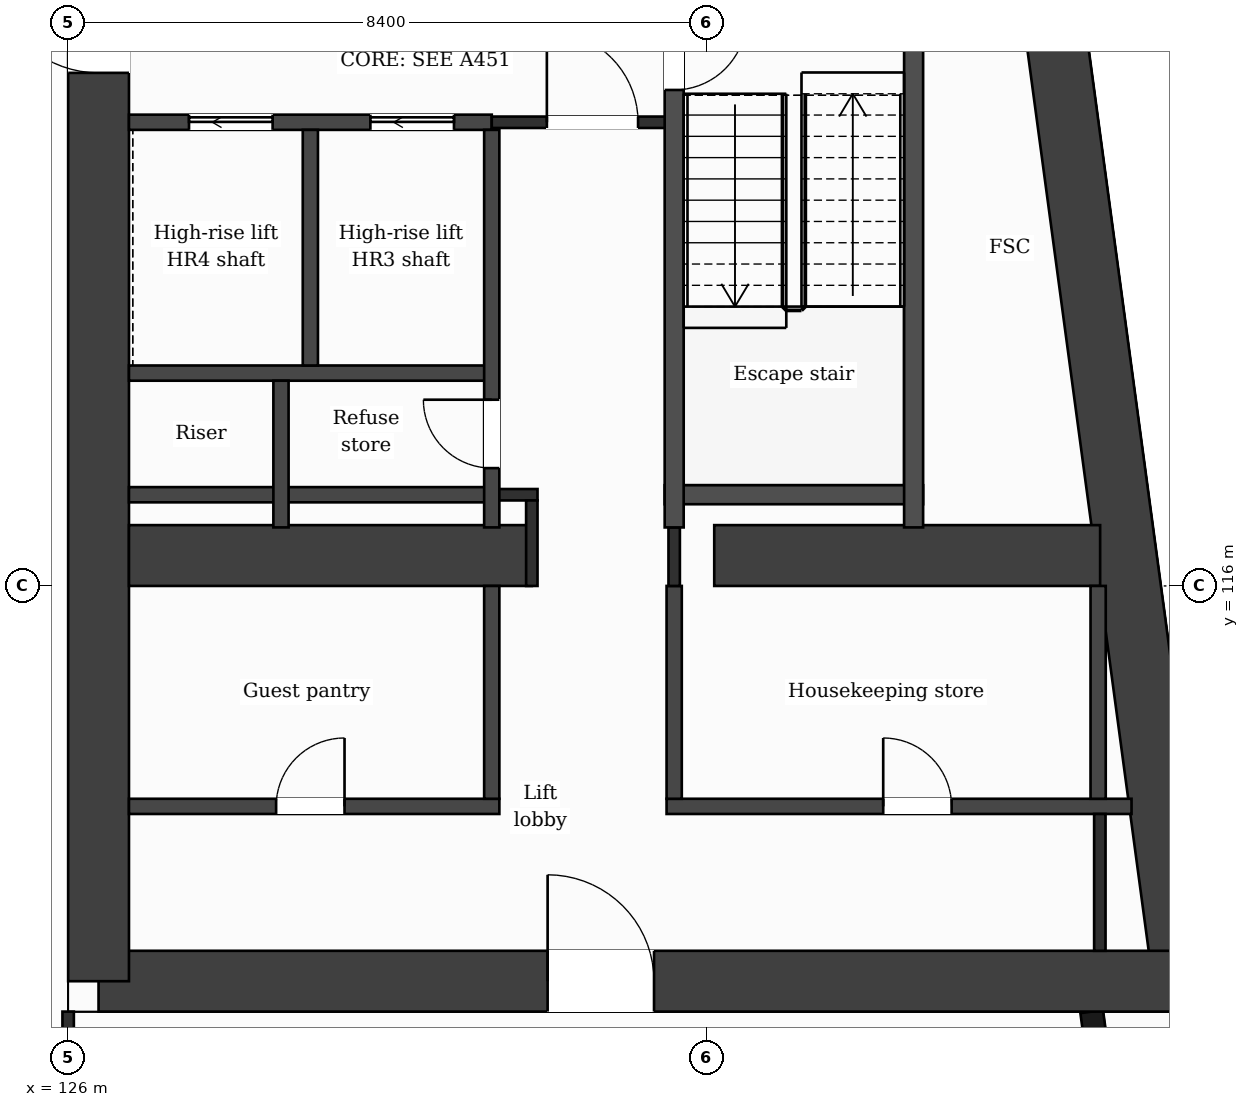
"""IFC4 building model, lengths in metres.
Left out: names, types, materials, properties, quantities, classifications, styles, units other than length and angle.
Written with IfcOpenShell. Run it as: python <this file> out.ifc"""

import sys

from ifc_helpers import new_model, si_unit, direction, frame, frame_2d, origin, place, context, subcontext, project, spatial, rectangle, extrude, element, fill, save


model = new_model("IFC4")
c1 = context("Model", 3, precision=1e-05, world=origin(), true_north=direction((0.0, 1.0)))
c2 = subcontext(c1, "Body", "Model", "MODEL_VIEW")
j1 = project(units=[si_unit("LENGTHUNIT", "METRE"), si_unit("PLANEANGLEUNIT", "RADIAN")], contexts=[c1])
p1 = place(None, origin())
s1 = spatial("IfcSite", under=j1, at=p1, CompositionType="ELEMENT")
p2 = place(p1, origin())
s2 = spatial("IfcBuilding", under=s1, at=p2, CompositionType="ELEMENT")
p3 = place(p2, frame((0.0, 0.0, 209.6)))
s3 = spatial("IfcBuildingStorey", under=s2, at=p3, CompositionType="ELEMENT", Elevation=209.6)
p4 = place(p3, frame((137.82, 132.0, 0.0), z_axis=(0.0, 0.0, 1.0), x_axis=(0.133408347329, -0.991061154956, 0.0)))
e1 = element("IfcWall", 1, at=p4, inside=s3, PredefinedType="SHEAR", context=c2, shape_type="SweptSolid", body=[
    extrude(rectangle(XDim=21.391, YDim=0.8, at=frame_2d((10.696, 0.0))), origin(), (0.0, 0.0, 1.0), 3.7),
])
p5 = place(p3, frame((140.673, 110.8, 0.0), z_axis=(0.0, 0.0, 1.0), x_axis=(-1.0, 0.0, 0.0)))
e2 = element("IfcWall", 2, at=p5, inside=s3, PredefinedType="SHEAR", context=c2, shape_type="SweptSolid", body=[
    extrude(rectangle(XDim=14.273, YDim=0.8, at=frame_2d((7.137, 0.0))), origin(), (0.0, 0.0, 1.0), 3.7),
])
p6 = place(p5, frame((6.965, 0.0, 0.0)))
e3 = element("IfcOpeningElement", 3, at=p6, cuts=e2, PredefinedType="OPENING", context=c2, shape_type="SweptSolid", body=[
    extrude(rectangle(XDim=1.4, YDim=2.1, at=frame_2d((0.7, 1.05))), frame((0.0, 0.41, 0.0), z_axis=(0.0, -1.0, 0.0), x_axis=(1.0, 0.0, 0.0)), (0.0, 0.0, 1.0), 0.82),
])
p7 = place(p3, frame((126.4, 110.8, 0.0), z_axis=(0.0, 0.0, 1.0), x_axis=(0.0, 1.0, 0.0)))
e4 = element("IfcWall", 4, at=p7, inside=s3, PredefinedType="SHEAR", context=c2, shape_type="SweptSolid", body=[
    extrude(rectangle(XDim=21.2, YDim=0.8, at=frame_2d((10.6, 0.0))), origin(), (0.0, 0.0, 1.0), 3.7),
])
p8 = place(p7, frame((11.95, 0.0, 0.0)))
e5 = element("IfcOpeningElement", 5, at=p8, cuts=e4, PredefinedType="OPENING", context=c2, shape_type="SweptSolid", body=[
    extrude(rectangle(XDim=1.4, YDim=2.1, at=frame_2d((0.7, 1.05))), frame((0.0, 0.41, 0.0), z_axis=(0.0, -1.0, 0.0), x_axis=(1.0, 0.0, 0.0)), (0.0, 0.0, 1.0), 0.82),
])
p9 = place(p3, frame((126.8, 116.4, 0.0), z_axis=(0.0, 0.0, 1.0), x_axis=(1.0, 0.0, 0.0)))
e6 = element("IfcWall", 6, at=p9, inside=s3, PredefinedType="SHEAR", context=c2, shape_type="SweptSolid", body=[
    extrude(rectangle(XDim=5.3, YDim=0.8, at=frame_2d((2.65, 0.0))), origin(), (0.0, 0.0, 1.0), 3.7),
])
p10 = place(p3, frame((134.5, 116.4, 0.0), z_axis=(0.0, 0.0, 1.0), x_axis=(1.0, 0.0, 0.0)))
e7 = element("IfcWall", 7, at=p10, inside=s3, PredefinedType="SHEAR", context=c2, shape_type="SweptSolid", body=[
    extrude(rectangle(XDim=5.077, YDim=0.8, at=frame_2d((2.539, 0.0))), origin(), (0.0, 0.0, 1.0), 3.7),
])
p11 = place(p3, frame((140.348, 103.85, 0.0), z_axis=(0.0, 0.0, 1.0), x_axis=(-0.133431549479, 0.991058031401, 0.0)))
e8 = element("IfcWall", 8, at=p11, inside=s3, PredefinedType="SOLIDWALL", context=c2, shape_type="SweptSolid", body=[
    extrude(rectangle(XDim=6.609, YDim=0.3, at=frame_2d((3.304, 0.0))), origin(), (0.0, 0.0, 1.0), 3.38),
])
p12 = place(p11, frame((0.737, 0.0, 0.9)))
e9 = element("IfcOpeningElement", 9, at=p12, cuts=e8, PredefinedType="OPENING", context=c2, shape_type="SweptSolid", body=[
    extrude(rectangle(XDim=1.2, YDim=2.1, at=frame_2d((0.6, 1.05))), frame((0.0, 0.16, 0.0), z_axis=(0.0, -1.0, 0.0), x_axis=(1.0, 0.0, 0.0)), (0.0, 0.0, 1.0), 0.32),
])
p13 = place(p11, frame((3.991, 0.0, 0.0)))
e10 = element("IfcOpeningElement", 10, at=p13, cuts=e8, PredefinedType="OPENING", context=c2, shape_type="SweptSolid", body=[
    extrude(rectangle(XDim=1.2, YDim=2.4, at=frame_2d((0.6, 1.2))), frame((0.0, 0.16, 0.0), z_axis=(0.0, -1.0, 0.0), x_axis=(1.0, 0.0, 0.0)), (0.0, 0.0, 1.0), 0.32),
])
p14 = place(p3, frame((126.8, 113.1, 0.0), z_axis=(0.0, 0.0, 1.0), x_axis=(1.0, 0.0, 0.0)))
e11 = element("IfcWall", 11, at=p14, inside=s3, PredefinedType="PARTITIONING", context=c2, shape_type="SweptSolid", body=[
    extrude(rectangle(XDim=4.873, YDim=0.2, at=frame_2d((2.437, 0.0))), origin(), (0.0, 0.0, 1.0), 3.38),
])
p15 = place(p14, frame((1.936, 0.0, 0.0)))
e12 = element("IfcOpeningElement", 12, at=p15, cuts=e11, PredefinedType="OPENING", context=c2, shape_type="SweptSolid", body=[
    extrude(rectangle(XDim=0.9, YDim=2.1, at=frame_2d((0.45, 1.05))), frame((0.0, 0.11, 0.0), z_axis=(0.0, -1.0, 0.0), x_axis=(1.0, 0.0, 0.0)), (0.0, 0.0, 1.0), 0.22),
])
p16 = place(p3, frame((133.873, 113.1, 0.0), z_axis=(0.0, 0.0, 1.0), x_axis=(1.0, 0.0, 0.0)))
e13 = element("IfcWall", 13, at=p16, inside=s3, PredefinedType="PARTITIONING", context=c2, shape_type="SweptSolid", body=[
    extrude(rectangle(XDim=6.117, YDim=0.2, at=frame_2d((3.059, 0.0))), origin(), (0.0, 0.0, 1.0), 3.38),
])
p17 = place(p16, frame((2.85, 0.0, 0.0)))
e14 = element("IfcOpeningElement", 14, at=p17, cuts=e13, PredefinedType="OPENING", context=c2, shape_type="SweptSolid", body=[
    extrude(rectangle(XDim=0.9, YDim=2.1, at=frame_2d((0.45, 1.05))), frame((0.0, 0.11, 0.0), z_axis=(0.0, -1.0, 0.0), x_axis=(1.0, 0.0, 0.0)), (0.0, 0.0, 1.0), 0.22),
])
p18 = place(p3, frame((126.8, 117.2, 0.0), z_axis=(0.0, 0.0, 1.0), x_axis=(1.0, 0.0, 0.0)))
e15 = element("IfcWall", 15, at=p18, inside=s3, PredefinedType="PARTITIONING", context=c2, shape_type="SweptSolid", body=[
    extrude(rectangle(XDim=4.773, YDim=0.2, at=frame_2d((2.386, 0.0))), origin(), (0.0, 0.0, 1.0), 3.38),
])
p19 = place(p3, frame((131.573, 117.2, 0.0), z_axis=(0.0, 0.0, 1.0), x_axis=(1.0, 0.0, 0.0)))
e16 = element("IfcWall", 16, at=p19, inside=s3, PredefinedType="PARTITIONING", context=c2, shape_type="SweptSolid", body=[
    extrude(rectangle(XDim=0.602, YDim=0.15, at=frame_2d((0.301, 0.0))), origin(), (0.0, 0.0, 1.0), 3.38),
])
p20 = place(p3, frame((133.848, 117.2, 0.0), z_axis=(0.0, 0.0, 1.0), x_axis=(1.0, 0.0, 0.0)))
e17 = element("IfcWall", 17, at=p20, inside=s3, PredefinedType="PARTITIONING", context=c2, shape_type="SweptSolid", body=[
    extrude(rectangle(XDim=3.4, YDim=0.25, at=frame_2d((1.7, 0.0))), origin(), (0.0, 0.0, 1.0), 3.38),
])
p21 = place(p3, frame((126.8, 118.8, 0.0), z_axis=(0.0, 0.0, 1.0), x_axis=(1.0, 0.0, 0.0)))
e18 = element("IfcWall", 18, at=p21, inside=s3, PredefinedType="PARTITIONING", context=c2, shape_type="SweptSolid", body=[
    extrude(rectangle(XDim=4.773, YDim=0.2, at=frame_2d((2.386, 0.0))), origin(), (0.0, 0.0, 1.0), 3.38),
])
p22 = place(p3, frame((126.8, 122.1, 0.0), z_axis=(0.0, 0.0, 1.0), x_axis=(1.0, 0.0, 0.0)))
e19 = element("IfcWall", 19, at=p22, inside=s3, PredefinedType="PARTITIONING", context=c2, shape_type="SweptSolid", body=[
    extrude(rectangle(XDim=4.773, YDim=0.2, at=frame_2d((2.386, 0.0))), origin(), (0.0, 0.0, 1.0), 3.38),
])
p23 = place(p22, frame((3.176, 0.0, 0.0)))
e20 = element("IfcOpeningElement", 20, at=p23, cuts=e19, PredefinedType="OPENING", context=c2, shape_type="SweptSolid", body=[
    extrude(rectangle(XDim=1.1, YDim=2.1, at=frame_2d((0.55, 1.05))), frame((0.0, 0.11, 0.0), z_axis=(0.0, -1.0, 0.0), x_axis=(1.0, 0.0, 0.0)), (0.0, 0.0, 1.0), 0.22),
])
p24 = place(p22, frame((0.79, 0.0, 0.0)))
e21 = element("IfcOpeningElement", 21, at=p24, cuts=e19, PredefinedType="OPENING", context=c2, shape_type="SweptSolid", body=[
    extrude(rectangle(XDim=1.1, YDim=2.1, at=frame_2d((0.55, 1.05))), frame((0.0, 0.11, 0.0), z_axis=(0.0, -1.0, 0.0), x_axis=(1.0, 0.0, 0.0)), (0.0, 0.0, 1.0), 0.22),
])
p25 = place(p3, frame((131.573, 122.1, 0.0), z_axis=(0.0, 0.0, 1.0), x_axis=(1.0, 0.0, 0.0)))
e22 = element("IfcWall", 22, at=p25, inside=s3, PredefinedType="PARTITIONING", context=c2, shape_type="SweptSolid", body=[
    extrude(rectangle(XDim=2.4, YDim=0.15, at=frame_2d((1.2, 0.0))), origin(), (0.0, 0.0, 1.0), 3.38),
])
p26 = place(p25, frame((0.725, 0.0, 0.0)))
e23 = element("IfcOpeningElement", 23, at=p26, cuts=e22, PredefinedType="OPENING", context=c2, shape_type="SweptSolid", body=[
    extrude(rectangle(XDim=1.2, YDim=2.1, at=frame_2d((0.6, 1.05))), frame((0.0, 0.085, 0.0), z_axis=(0.0, -1.0, 0.0), x_axis=(1.0, 0.0, 0.0)), (0.0, 0.0, 1.0), 0.17),
])
p27 = place(p3, frame((126.0, 109.075, 0.0), z_axis=(0.0, 0.0, 1.0), x_axis=(0.0, 1.0, 0.0)))
e24 = element("IfcWall", 24, at=p27, inside=s3, PredefinedType="PARTITIONING", context=c2, shape_type="SweptSolid", body=[
    extrude(rectangle(XDim=1.325, YDim=0.15, at=frame_2d((0.663, 0.0))), origin(), (0.0, 0.0, 1.0), 3.38),
])
p28 = place(p3, frame((128.8, 116.77, 0.0), z_axis=(0.0, 0.0, 1.0), x_axis=(0.0, 1.0, 0.0)))
e25 = element("IfcWall", 25, at=p28, inside=s3, PredefinedType="PARTITIONING", context=c2, shape_type="SweptSolid", body=[
    extrude(rectangle(XDim=1.93, YDim=0.2, at=frame_2d((0.965, 0.0))), origin(), (0.0, 0.0, 1.0), 3.38),
])
p29 = place(p3, frame((129.187, 118.9, 0.0), z_axis=(0.0, 0.0, 1.0), x_axis=(0.0, 1.0, 0.0)))
e26 = element("IfcWall", 26, at=p29, inside=s3, PredefinedType="PARTITIONING", context=c2, shape_type="SweptSolid", body=[
    extrude(rectangle(XDim=3.1, YDim=0.2, at=frame_2d((1.55, 0.0))), origin(), (0.0, 0.0, 1.0), 3.38),
])
p30 = place(p3, frame((131.573, 113.2, 0.0), z_axis=(0.0, 0.0, 1.0), x_axis=(0.0, 1.0, 0.0)))
e27 = element("IfcWall", 27, at=p30, inside=s3, PredefinedType="PARTITIONING", context=c2, shape_type="SweptSolid", body=[
    extrude(rectangle(XDim=2.8, YDim=0.2, at=frame_2d((1.4, 0.0))), origin(), (0.0, 0.0, 1.0), 3.38),
])
p31 = place(p3, frame((131.573, 116.77, 0.0), z_axis=(0.0, 0.0, 1.0), x_axis=(0.0, 1.0, 0.0)))
e28 = element("IfcWall", 28, at=p31, inside=s3, PredefinedType="PARTITIONING", context=c2, shape_type="SweptSolid", body=[
    extrude(rectangle(XDim=5.23, YDim=0.2, at=frame_2d((2.615, 0.0))), origin(), (0.0, 0.0, 1.0), 3.38),
])
p32 = place(p31, frame((0.78, 0.0, 0.0)))
e29 = element("IfcOpeningElement", 29, at=p32, cuts=e28, PredefinedType="OPENING", context=c2, shape_type="SweptSolid", body=[
    extrude(rectangle(XDim=0.9, YDim=2.1, at=frame_2d((0.45, 1.05))), frame((0.0, 0.11, 0.0), z_axis=(0.0, -1.0, 0.0), x_axis=(1.0, 0.0, 0.0)), (0.0, 0.0, 1.0), 0.22),
])
p33 = place(p3, frame((132.1, 116.0, 0.0), z_axis=(0.0, 0.0, 1.0), x_axis=(0.0, 1.0, 0.0)))
e30 = element("IfcWall", 30, at=p33, inside=s3, PredefinedType="PARTITIONING", context=c2, shape_type="SweptSolid", body=[
    extrude(rectangle(XDim=1.125, YDim=0.15, at=frame_2d((0.562, 0.0))), origin(), (0.0, 0.0, 1.0), 3.38),
])
p34 = place(p3, frame((133.973, 113.2, 0.0), z_axis=(0.0, 0.0, 1.0), x_axis=(0.0, 1.0, 0.0)))
e31 = element("IfcWall", 31, at=p34, inside=s3, PredefinedType="PARTITIONING", context=c2, shape_type="SweptSolid", body=[
    extrude(rectangle(XDim=2.8, YDim=0.2, at=frame_2d((1.4, 0.0))), origin(), (0.0, 0.0, 1.0), 3.38),
])
p35 = place(p3, frame((133.973, 116.0, 0.0), z_axis=(0.0, 0.0, 1.0), x_axis=(0.0, 1.0, 0.0)))
e32 = element("IfcWall", 32, at=p35, inside=s3, PredefinedType="PARTITIONING", context=c2, shape_type="SweptSolid", body=[
    extrude(rectangle(XDim=0.77, YDim=0.15, at=frame_2d((0.385, 0.0))), origin(), (0.0, 0.0, 1.0), 3.38),
])
p36 = place(p3, frame((133.973, 116.77, 0.0), z_axis=(0.0, 0.0, 1.0), x_axis=(0.0, 1.0, 0.0)))
e33 = element("IfcWall", 33, at=p36, inside=s3, PredefinedType="PARTITIONING", context=c2, shape_type="SweptSolid", body=[
    extrude(rectangle(XDim=7.055, YDim=0.25, at=frame_2d((3.527, 0.0))), origin(), (0.0, 0.0, 1.0), 3.38),
])
p37 = place(p36, frame((5.755, 0.0, 0.0)))
e34 = element("IfcOpeningElement", 34, at=p37, cuts=e33, PredefinedType="OPENING", context=c2, shape_type="SweptSolid", body=[
    extrude(rectangle(XDim=0.95, YDim=2.1, at=frame_2d((0.475, 1.05))), frame((0.0, 0.135, 0.0), z_axis=(0.0, -1.0, 0.0), x_axis=(1.0, 0.0, 0.0)), (0.0, 0.0, 1.0), 0.27),
])
p38 = place(p3, frame((137.123, 116.77, 0.0), z_axis=(0.0, 0.0, 1.0), x_axis=(0.0, 1.0, 0.0)))
e35 = element("IfcWall", 35, at=p38, inside=s3, PredefinedType="PARTITIONING", context=c2, shape_type="SweptSolid", body=[
    extrude(rectangle(XDim=7.055, YDim=0.25, at=frame_2d((3.527, 0.0))), origin(), (0.0, 0.0, 1.0), 3.38),
])
p39 = place(p3, frame((139.551, 113.2, 0.0), z_axis=(0.0, 0.0, 1.0), x_axis=(0.0, 1.0, 0.0)))
e36 = element("IfcWall", 36, at=p39, inside=s3, PredefinedType="PARTITIONING", context=c2, shape_type="SweptSolid", body=[
    extrude(rectangle(XDim=2.8, YDim=0.2, at=frame_2d((1.4, 0.0))), origin(), (0.0, 0.0, 1.0), 3.38),
])
p40 = place(p3, frame((139.573, 111.2, 0.0), z_axis=(0.0, 0.0, 1.0), x_axis=(0.0, 1.0, 0.0)))
e37 = element("IfcWall", 37, at=p40, inside=s3, PredefinedType="PARTITIONING", context=c2, shape_type="SweptSolid", body=[
    extrude(rectangle(XDim=1.8, YDim=0.15, at=frame_2d((0.9, 0.0))), origin(), (0.0, 0.0, 1.0), 3.38),
])
p41 = place(p26, origin())
e38 = element("IfcDoor", 38, at=p41, inside=s3, OperationType="SINGLE_SWING_LEFT", PredefinedType="DOOR", context=c2, shape_type="SweptSolid", body=[
    extrude(rectangle(XDim=1.2, YDim=2.1, at=frame_2d((0.6, 1.05))), frame((0.0, 0.025, 0.0), z_axis=(0.0, -1.0, 0.0), x_axis=(1.0, 0.0, 0.0)), (0.0, 0.0, 1.0), 0.05),
])
fill(e23, e38)
p42 = place(p23, origin())
e39 = element("IfcDoor", 39, at=p42, inside=s3, OperationType="SLIDING_TO_LEFT", PredefinedType="DOOR", context=c2, shape_type="SweptSolid", body=[
    extrude(rectangle(XDim=1.1, YDim=2.1, at=frame_2d((0.55, 1.05))), frame((0.0, 0.025, 0.0), z_axis=(0.0, -1.0, 0.0), x_axis=(1.0, 0.0, 0.0)), (0.0, 0.0, 1.0), 0.05),
])
fill(e20, e39)
p43 = place(p24, origin())
e40 = element("IfcDoor", 40, at=p43, inside=s3, OperationType="SLIDING_TO_LEFT", PredefinedType="DOOR", context=c2, shape_type="SweptSolid", body=[
    extrude(rectangle(XDim=1.1, YDim=2.1, at=frame_2d((0.55, 1.05))), frame((0.0, 0.025, 0.0), z_axis=(0.0, -1.0, 0.0), x_axis=(1.0, 0.0, 0.0)), (0.0, 0.0, 1.0), 0.05),
])
fill(e21, e40)
p44 = place(p37, origin())
e41 = element("IfcDoor", 41, at=p44, inside=s3, OperationType="SINGLE_SWING_RIGHT", PredefinedType="DOOR", context=c2, shape_type="SweptSolid", body=[
    extrude(rectangle(XDim=0.95, YDim=2.1, at=frame_2d((0.475, 1.05))), frame((0.0, 0.025, 0.0), z_axis=(0.0, -1.0, 0.0), x_axis=(1.0, 0.0, 0.0)), (0.0, 0.0, 1.0), 0.05),
])
fill(e34, e41)
p45 = place(p32, origin())
e42 = element("IfcDoor", 42, at=p45, inside=s3, OperationType="SINGLE_SWING_RIGHT", PredefinedType="DOOR", context=c2, shape_type="SweptSolid", body=[
    extrude(rectangle(XDim=0.9, YDim=2.1, at=frame_2d((0.45, 1.05))), frame((0.0, 0.025, 0.0), z_axis=(0.0, -1.0, 0.0), x_axis=(1.0, 0.0, 0.0)), (0.0, 0.0, 1.0), 0.05),
])
fill(e29, e42)
p46 = place(p17, origin())
e43 = element("IfcDoor", 43, at=p46, inside=s3, OperationType="SINGLE_SWING_LEFT", PredefinedType="DOOR", context=c2, shape_type="SweptSolid", body=[
    extrude(rectangle(XDim=0.9, YDim=2.1, at=frame_2d((0.45, 1.05))), frame((0.0, 0.025, 0.0), z_axis=(0.0, -1.0, 0.0), x_axis=(1.0, 0.0, 0.0)), (0.0, 0.0, 1.0), 0.05),
])
fill(e14, e43)
p47 = place(p15, origin())
e44 = element("IfcDoor", 44, at=p47, inside=s3, OperationType="SINGLE_SWING_RIGHT", PredefinedType="DOOR", context=c2, shape_type="SweptSolid", body=[
    extrude(rectangle(XDim=0.9, YDim=2.1, at=frame_2d((0.45, 1.05))), frame((0.0, 0.025, 0.0), z_axis=(0.0, -1.0, 0.0), x_axis=(1.0, 0.0, 0.0)), (0.0, 0.0, 1.0), 0.05),
])
fill(e12, e44)
p48 = place(p6, origin())
e45 = element("IfcDoor", 45, at=p48, inside=s3, OperationType="SINGLE_SWING_RIGHT", PredefinedType="DOOR", context=c2, shape_type="SweptSolid", body=[
    extrude(rectangle(XDim=1.4, YDim=2.1, at=frame_2d((0.7, 1.05))), frame((0.0, 0.025, 0.0), z_axis=(0.0, -1.0, 0.0), x_axis=(1.0, 0.0, 0.0)), (0.0, 0.0, 1.0), 0.05),
])
fill(e3, e45)
p49 = place(p8, origin())
e46 = element("IfcDoor", 46, at=p49, inside=s3, OperationType="SINGLE_SWING_RIGHT", PredefinedType="DOOR", context=c2, shape_type="SweptSolid", body=[
    extrude(rectangle(XDim=1.4, YDim=2.1, at=frame_2d((0.7, 1.05))), frame((0.0, 0.025, 0.0), z_axis=(0.0, -1.0, 0.0), x_axis=(1.0, 0.0, 0.0)), (0.0, 0.0, 1.0), 0.05),
])
fill(e5, e46)
save(model, sys.argv[1])
